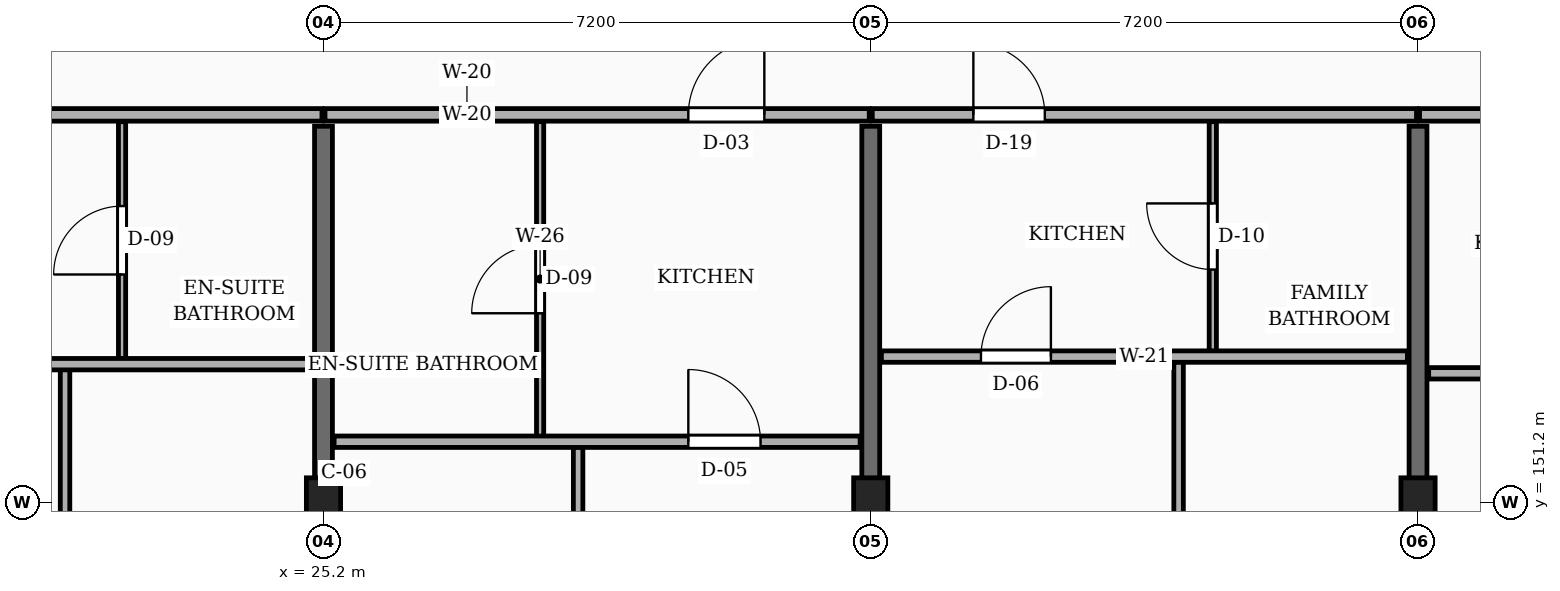
"""IFC4 building model, lengths in metres.
Left out: names, types, materials, properties, quantities, classifications, styles, units other than length and angle.
Written with IfcOpenShell. Run it as: python <this file> out.ifc"""

import sys

from ifc_helpers import new_model, si_unit, direction, frame, frame_2d, origin, origin_2d, place, context, subcontext, project, spatial, rectangle, extrude, element, fill, save


model = new_model("IFC4")
c1 = context("Model", 3, precision=1e-05, world=origin(), true_north=direction((0.0, 1.0)))
c2 = subcontext(c1, "Body", "Model", "MODEL_VIEW")
j1 = project(units=[si_unit("LENGTHUNIT", "METRE"), si_unit("PLANEANGLEUNIT", "RADIAN")], contexts=[c1])
p1 = place(None, origin())
s1 = spatial("IfcSite", under=j1, at=p1, CompositionType="ELEMENT")
p2 = place(p1, origin())
s2 = spatial("IfcBuilding", under=s1, at=p2, CompositionType="ELEMENT")
p3 = place(p2, frame((0.0, 0.0, 20.25)))
s3 = spatial("IfcBuildingStorey", under=s2, at=p3, CompositionType="ELEMENT", Elevation=20.25)
for number, where, z_axis, x_axis in (
    (1, (25.2, 151.2, 0.0), (0.0, 0.0, 1.0), (1.0, 0.0, 0.0)),
    (2, (32.4, 151.2, 0.0), (0.0, 0.0, 1.0), (1.0, 0.0, 0.0)),
    (3, (39.6, 151.2, 0.0), (0.0, 0.0, 1.0), (1.0, 0.0, 0.0)),
):
    element("IfcColumn", number, at=place(p3, frame(where, z_axis=z_axis, x_axis=x_axis)), inside=s3, PredefinedType="COLUMN", context=c2, shape_type="SweptSolid", body=[
        extrude(rectangle(XDim=0.45, YDim=0.65, at=origin_2d()), origin(), (0.0, 0.0, 1.0), 3.15),
    ])
for number, where, z_axis, x_axis in (
    (4, (25.2, 144.275, 0.0), (0.0, 0.0, 1.0), (0.0, 1.0, 0.0)),
    (5, (32.4, 144.275, 0.0), (0.0, 0.0, 1.0), (0.0, 1.0, 0.0)),
    (6, (39.6, 144.275, 0.0), (0.0, 0.0, 1.0), (0.0, 1.0, 0.0)),
):
    element("IfcWall", number, at=place(p3, frame(where, z_axis=z_axis, x_axis=x_axis)), inside=s3, PredefinedType="SOLIDWALL", context=c2, shape_type="SweptSolid", body=[
        extrude(rectangle(XDim=11.875, YDim=0.235, at=frame_2d((5.938, 0.0))), origin(), (0.0, 0.0, 1.0), 2.185),
    ])
p4 = place(p3, frame((18.02, 156.3, 0.0), z_axis=(0.0, 0.0, 1.0), x_axis=(1.0, 0.0, 0.0)))
e7 = element("IfcWall", 7, at=p4, inside=s3, PredefinedType="PARTITIONING", context=c2, shape_type="SweptSolid", body=[
    extrude(rectangle(XDim=7.16, YDim=0.165, at=frame_2d((3.58, 0.0))), origin(), (0.0, 0.0, 1.0), 2.32),
])
p5 = place(p4, frame((1.33, 0.0, 0.0)))
e8 = element("IfcOpeningElement", 8, at=p5, cuts=e7, PredefinedType="OPENING", context=c2, shape_type="SweptSolid", body=[
    extrude(rectangle(XDim=1.14, YDim=2.18, at=frame_2d((0.57, 1.09))), frame((0.0, 0.093, 0.0), z_axis=(0.0, -1.0, 0.0), x_axis=(1.0, 0.0, 0.0)), (0.0, 0.0, 1.0), 0.185),
])
p6 = place(p3, frame((25.22, 156.3, 0.0), z_axis=(0.0, 0.0, 1.0), x_axis=(1.0, 0.0, 0.0)))
e9 = element("IfcWall", 9, at=p6, inside=s3, PredefinedType="PARTITIONING", context=c2, shape_type="SweptSolid", body=[
    extrude(rectangle(XDim=7.16, YDim=0.165, at=frame_2d((3.58, 0.0))), origin(), (0.0, 0.0, 1.0), 2.32),
])
p7 = place(p6, frame((4.78, 0.0, 0.0)))
e10 = element("IfcOpeningElement", 10, at=p7, cuts=e9, PredefinedType="OPENING", context=c2, shape_type="SweptSolid", body=[
    extrude(rectangle(XDim=1.0, YDim=2.15, at=frame_2d((0.5, 1.075))), frame((0.0, 0.093, 0.0), z_axis=(0.0, -1.0, 0.0), x_axis=(1.0, 0.0, 0.0)), (0.0, 0.0, 1.0), 0.185),
])
p8 = place(p3, frame((32.42, 156.3, 0.0), z_axis=(0.0, 0.0, 1.0), x_axis=(1.0, 0.0, 0.0)))
e11 = element("IfcWall", 11, at=p8, inside=s3, PredefinedType="PARTITIONING", context=c2, shape_type="SweptSolid", body=[
    extrude(rectangle(XDim=7.16, YDim=0.165, at=frame_2d((3.58, 0.0))), origin(), (0.0, 0.0, 1.0), 2.32),
])
p9 = place(p8, frame((1.33, 0.0, 0.0)))
e12 = element("IfcOpeningElement", 12, at=p9, cuts=e11, PredefinedType="OPENING", context=c2, shape_type="SweptSolid", body=[
    extrude(rectangle(XDim=0.94, YDim=2.12, at=frame_2d((0.47, 1.06))), frame((0.0, 0.093, 0.0), z_axis=(0.0, -1.0, 0.0), x_axis=(1.0, 0.0, 0.0)), (0.0, 0.0, 1.0), 0.185),
])
p10 = place(p3, frame((39.62, 156.3, 0.0), z_axis=(0.0, 0.0, 1.0), x_axis=(1.0, 0.0, 0.0)))
e13 = element("IfcWall", 13, at=p10, inside=s3, PredefinedType="PARTITIONING", context=c2, shape_type="SweptSolid", body=[
    extrude(rectangle(XDim=7.16, YDim=0.165, at=frame_2d((3.58, 0.0))), origin(), (0.0, 0.0, 1.0), 2.32),
])
p11 = place(p10, frame((1.33, 0.0, 0.0)))
e14 = element("IfcOpeningElement", 14, at=p11, cuts=e13, PredefinedType="OPENING", context=c2, shape_type="SweptSolid", body=[
    extrude(rectangle(XDim=1.14, YDim=2.18, at=frame_2d((0.57, 1.09))), frame((0.0, 0.093, 0.0), z_axis=(0.0, -1.0, 0.0), x_axis=(1.0, 0.0, 0.0)), (0.0, 0.0, 1.0), 0.185),
])
p12 = place(p3, frame((21.8, 144.175, 0.0), z_axis=(0.0, 0.0, 1.0), x_axis=(0.0, 1.0, 0.0)))
e15 = element("IfcWall", 15, at=p12, inside=s3, PredefinedType="PARTITIONING", context=c2, shape_type="SweptSolid", body=[
    extrude(rectangle(XDim=8.775, YDim=0.125, at=frame_2d((4.387, 0.0))), origin(), (0.0, 0.0, 1.0), 2.32),
])
p13 = place(p12, frame((3.938, 0.0, 0.0)))
e16 = element("IfcOpeningElement", 16, at=p13, cuts=e15, PredefinedType="OPENING", context=c2, shape_type="SweptSolid", body=[
    extrude(rectangle(XDim=0.9, YDim=2.1, at=frame_2d((0.45, 1.05))), frame((0.0, 0.073, 0.0), z_axis=(0.0, -1.0, 0.0), x_axis=(1.0, 0.0, 0.0)), (0.0, 0.0, 1.0), 0.145),
])
p14 = place(p3, frame((22.55, 153.09, 0.0), z_axis=(0.0, 0.0, 1.0), x_axis=(0.0, 1.0, 0.0)))
e17 = element("IfcWall", 17, at=p14, inside=s3, PredefinedType="PARTITIONING", context=c2, shape_type="SweptSolid", body=[
    extrude(rectangle(XDim=3.12, YDim=0.095, at=frame_2d((1.56, 0.0))), origin(), (0.0, 0.0, 1.0), 2.32),
])
p15 = place(p14, frame((1.11, 0.0, 0.0)))
e18 = element("IfcOpeningElement", 18, at=p15, cuts=e17, PredefinedType="OPENING", context=c2, shape_type="SweptSolid", body=[
    extrude(rectangle(XDim=0.9, YDim=2.05, at=frame_2d((0.45, 1.025))), frame((0.0, 0.058, 0.0), z_axis=(0.0, -1.0, 0.0), x_axis=(1.0, 0.0, 0.0)), (0.0, 0.0, 1.0), 0.115),
])
p16 = place(p3, frame((18.14, 153.02, 0.0), z_axis=(0.0, 0.0, 1.0), x_axis=(1.0, 0.0, 0.0)))
e19 = element("IfcWall", 19, at=p16, inside=s3, PredefinedType="PARTITIONING", context=c2, shape_type="SweptSolid", body=[
    extrude(rectangle(XDim=6.92, YDim=0.15, at=frame_2d((3.46, 0.0))), origin(), (0.0, 0.0, 1.0), 2.32),
])
p17 = place(p16, frame((1.31, 0.0, 0.0)))
e20 = element("IfcOpeningElement", 20, at=p17, cuts=e19, PredefinedType="OPENING", context=c2, shape_type="SweptSolid", body=[
    extrude(rectangle(XDim=0.95, YDim=2.1, at=frame_2d((0.475, 1.05))), frame((0.0, 0.085, 0.0), z_axis=(0.0, -1.0, 0.0), x_axis=(1.0, 0.0, 0.0)), (0.0, 0.0, 1.0), 0.17),
])
p18 = place(p3, frame((28.55, 144.175, 0.0), z_axis=(0.0, 0.0, 1.0), x_axis=(0.0, 1.0, 0.0)))
e21 = element("IfcWall", 21, at=p18, inside=s3, PredefinedType="PARTITIONING", context=c2, shape_type="SweptSolid", body=[
    extrude(rectangle(XDim=7.755, YDim=0.125, at=frame_2d((3.877, 0.0))), origin(), (0.0, 0.0, 1.0), 2.32),
])
p19 = place(p18, frame((3.427, 0.0, 0.0)))
e22 = element("IfcOpeningElement", 22, at=p19, cuts=e21, PredefinedType="OPENING", context=c2, shape_type="SweptSolid", body=[
    extrude(rectangle(XDim=0.9, YDim=2.1, at=frame_2d((0.45, 1.05))), frame((0.0, 0.073, 0.0), z_axis=(0.0, -1.0, 0.0), x_axis=(1.0, 0.0, 0.0)), (0.0, 0.0, 1.0), 0.145),
])
p20 = place(p3, frame((28.05, 152.07, 0.0), z_axis=(0.0, 0.0, 1.0), x_axis=(0.0, 1.0, 0.0)))
e23 = element("IfcWall", 23, at=p20, inside=s3, PredefinedType="PARTITIONING", context=c2, shape_type="SweptSolid", body=[
    extrude(rectangle(XDim=4.14, YDim=0.095, at=frame_2d((2.07, 0.0))), origin(), (0.0, 0.0, 1.0), 2.32),
])
p21 = place(p20, frame((1.62, 0.0, 0.0)))
e24 = element("IfcOpeningElement", 24, at=p21, cuts=e23, PredefinedType="OPENING", context=c2, shape_type="SweptSolid", body=[
    extrude(rectangle(XDim=0.9, YDim=2.05, at=frame_2d((0.45, 1.025))), frame((0.0, 0.058, 0.0), z_axis=(0.0, -1.0, 0.0), x_axis=(1.0, 0.0, 0.0)), (0.0, 0.0, 1.0), 0.115),
])
p22 = place(p3, frame((25.34, 152.0, 0.0), z_axis=(0.0, 0.0, 1.0), x_axis=(1.0, 0.0, 0.0)))
e25 = element("IfcWall", 25, at=p22, inside=s3, PredefinedType="PARTITIONING", context=c2, shape_type="SweptSolid", body=[
    extrude(rectangle(XDim=6.92, YDim=0.15, at=frame_2d((3.46, 0.0))), origin(), (0.0, 0.0, 1.0), 2.32),
])
p23 = place(p22, frame((4.66, 0.0, 0.0)))
e26 = element("IfcOpeningElement", 26, at=p23, cuts=e25, PredefinedType="OPENING", context=c2, shape_type="SweptSolid", body=[
    extrude(rectangle(XDim=0.95, YDim=2.1, at=frame_2d((0.475, 1.05))), frame((0.0, 0.085, 0.0), z_axis=(0.0, -1.0, 0.0), x_axis=(1.0, 0.0, 0.0)), (0.0, 0.0, 1.0), 0.17),
])
p24 = place(p3, frame((36.45, 144.175, 0.0), z_axis=(0.0, 0.0, 1.0), x_axis=(0.0, 1.0, 0.0)))
e27 = element("IfcWall", 27, at=p24, inside=s3, PredefinedType="PARTITIONING", context=c2, shape_type="SweptSolid", body=[
    extrude(rectangle(XDim=8.875, YDim=0.125, at=frame_2d((4.438, 0.0))), origin(), (0.0, 0.0, 1.0), 2.32),
])
p25 = place(p24, frame((3.998, 0.0, 0.0)))
e28 = element("IfcOpeningElement", 28, at=p25, cuts=e27, PredefinedType="OPENING", context=c2, shape_type="SweptSolid", body=[
    extrude(rectangle(XDim=0.88, YDim=2.08, at=frame_2d((0.44, 1.04))), frame((0.0, 0.073, 0.0), z_axis=(0.0, -1.0, 0.0), x_axis=(1.0, 0.0, 0.0)), (0.0, 0.0, 1.0), 0.145),
])
p26 = place(p3, frame((36.9, 153.19, 0.0), z_axis=(0.0, 0.0, 1.0), x_axis=(0.0, 1.0, 0.0)))
e29 = element("IfcWall", 29, at=p26, inside=s3, PredefinedType="PARTITIONING", context=c2, shape_type="SweptSolid", body=[
    extrude(rectangle(XDim=3.02, YDim=0.095, at=frame_2d((1.51, 0.0))), origin(), (0.0, 0.0, 1.0), 2.32),
])
p27 = place(p26, frame((1.075, 0.0, 0.0)))
e30 = element("IfcOpeningElement", 30, at=p27, cuts=e29, PredefinedType="OPENING", context=c2, shape_type="SweptSolid", body=[
    extrude(rectangle(XDim=0.87, YDim=2.05, at=frame_2d((0.435, 1.025))), frame((0.0, 0.058, 0.0), z_axis=(0.0, -1.0, 0.0), x_axis=(1.0, 0.0, 0.0)), (0.0, 0.0, 1.0), 0.115),
])
p28 = place(p3, frame((32.54, 153.12, 0.0), z_axis=(0.0, 0.0, 1.0), x_axis=(1.0, 0.0, 0.0)))
e31 = element("IfcWall", 31, at=p28, inside=s3, PredefinedType="PARTITIONING", context=c2, shape_type="SweptSolid", body=[
    extrude(rectangle(XDim=6.92, YDim=0.15, at=frame_2d((3.46, 0.0))), origin(), (0.0, 0.0, 1.0), 2.32),
])
p29 = place(p28, frame((1.31, 0.0, 0.0)))
e32 = element("IfcOpeningElement", 32, at=p29, cuts=e31, PredefinedType="OPENING", context=c2, shape_type="SweptSolid", body=[
    extrude(rectangle(XDim=0.92, YDim=2.1, at=frame_2d((0.46, 1.05))), frame((0.0, 0.085, 0.0), z_axis=(0.0, -1.0, 0.0), x_axis=(1.0, 0.0, 0.0)), (0.0, 0.0, 1.0), 0.17),
])
p30 = place(p3, frame((39.74, 152.9, 0.0), z_axis=(0.0, 0.0, 1.0), x_axis=(1.0, 0.0, 0.0)))
e33 = element("IfcWall", 33, at=p30, inside=s3, PredefinedType="PARTITIONING", context=c2, shape_type="SweptSolid", body=[
    extrude(rectangle(XDim=6.92, YDim=0.15, at=frame_2d((3.46, 0.0))), origin(), (0.0, 0.0, 1.0), 2.32),
])
p31 = place(p30, frame((1.31, 0.0, 0.0)))
e34 = element("IfcOpeningElement", 34, at=p31, cuts=e33, PredefinedType="OPENING", context=c2, shape_type="SweptSolid", body=[
    extrude(rectangle(XDim=0.95, YDim=2.1, at=frame_2d((0.475, 1.05))), frame((0.0, 0.085, 0.0), z_axis=(0.0, -1.0, 0.0), x_axis=(1.0, 0.0, 0.0)), (0.0, 0.0, 1.0), 0.17),
])
p32 = place(p7, origin())
e35 = element("IfcDoor", 35, at=p32, inside=s3, OperationType="SINGLE_SWING_RIGHT", PredefinedType="DOOR", context=c2, shape_type="SweptSolid", body=[
    extrude(rectangle(XDim=1.0, YDim=2.15, at=frame_2d((0.5, 1.075))), frame((0.0, 0.025, 0.0), z_axis=(0.0, -1.0, 0.0), x_axis=(1.0, 0.0, 0.0)), (0.0, 0.0, 1.0), 0.05),
])
fill(e10, e35)
p33 = place(p9, origin())
e36 = element("IfcDoor", 36, at=p33, inside=s3, OperationType="SINGLE_SWING_LEFT", PredefinedType="DOOR", context=c2, shape_type="SweptSolid", body=[
    extrude(rectangle(XDim=0.94, YDim=2.12, at=frame_2d((0.47, 1.06))), frame((0.0, 0.025, 0.0), z_axis=(0.0, -1.0, 0.0), x_axis=(1.0, 0.0, 0.0)), (0.0, 0.0, 1.0), 0.05),
])
fill(e12, e36)
p34 = place(p15, origin())
e37 = element("IfcDoor", 37, at=p34, inside=s3, OperationType="SINGLE_SWING_LEFT", PredefinedType="DOOR", context=c2, shape_type="SweptSolid", body=[
    extrude(rectangle(XDim=0.9, YDim=2.05, at=frame_2d((0.45, 1.025))), frame((0.0, 0.025, 0.0), z_axis=(0.0, -1.0, 0.0), x_axis=(1.0, 0.0, 0.0)), (0.0, 0.0, 1.0), 0.05),
])
fill(e18, e37)
p35 = place(p21, origin())
e38 = element("IfcDoor", 38, at=p35, inside=s3, OperationType="SINGLE_SWING_LEFT", PredefinedType="DOOR", context=c2, shape_type="SweptSolid", body=[
    extrude(rectangle(XDim=0.9, YDim=2.05, at=frame_2d((0.45, 1.025))), frame((0.0, 0.025, 0.0), z_axis=(0.0, -1.0, 0.0), x_axis=(1.0, 0.0, 0.0)), (0.0, 0.0, 1.0), 0.05),
])
fill(e24, e38)
p36 = place(p23, origin())
e39 = element("IfcDoor", 39, at=p36, inside=s3, OperationType="SINGLE_SWING_LEFT", PredefinedType="DOOR", context=c2, shape_type="SweptSolid", body=[
    extrude(rectangle(XDim=0.95, YDim=2.1, at=frame_2d((0.475, 1.05))), frame((0.0, 0.025, 0.0), z_axis=(0.0, -1.0, 0.0), x_axis=(1.0, 0.0, 0.0)), (0.0, 0.0, 1.0), 0.05),
])
fill(e26, e39)
p37 = place(p27, origin())
e40 = element("IfcDoor", 40, at=p37, inside=s3, OperationType="SINGLE_SWING_RIGHT", PredefinedType="DOOR", context=c2, shape_type="SweptSolid", body=[
    extrude(rectangle(XDim=0.87, YDim=2.05, at=frame_2d((0.435, 1.025))), frame((0.0, 0.025, 0.0), z_axis=(0.0, -1.0, 0.0), x_axis=(1.0, 0.0, 0.0)), (0.0, 0.0, 1.0), 0.05),
])
fill(e30, e40)
p38 = place(p29, origin())
e41 = element("IfcDoor", 41, at=p38, inside=s3, OperationType="SINGLE_SWING_RIGHT", PredefinedType="DOOR", context=c2, shape_type="SweptSolid", body=[
    extrude(rectangle(XDim=0.92, YDim=2.1, at=frame_2d((0.46, 1.05))), frame((0.0, 0.025, 0.0), z_axis=(0.0, -1.0, 0.0), x_axis=(1.0, 0.0, 0.0)), (0.0, 0.0, 1.0), 0.05),
])
fill(e32, e41)
save(model, sys.argv[1])
